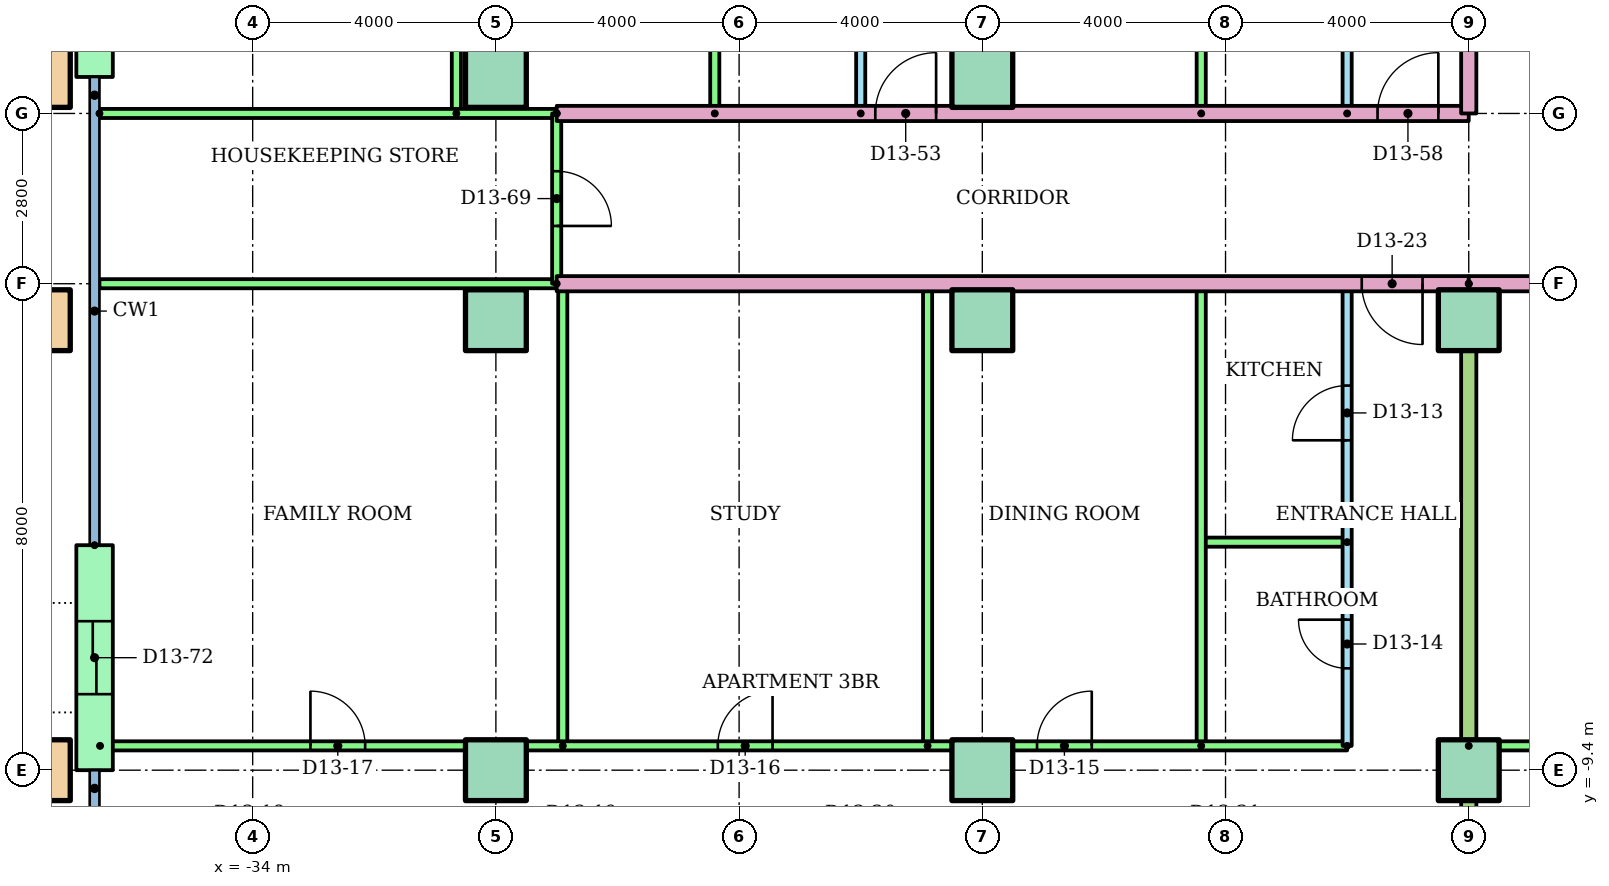
"""IFC4 building model, lengths in metres.
Left out: names, types, materials, properties, quantities, classifications, styles, units other than length and angle.
Written with IfcOpenShell. Run it as: python <this file> out.ifc"""

import sys

from ifc_helpers import new_model, si_unit, direction, frame, frame_2d, origin, origin_2d, place, context, subcontext, project, spatial, rectangle, hollow_rectangle, extrude, element, fill, save


model = new_model("IFC4")
c1 = context("Model", 3, precision=1e-05, world=origin(), true_north=direction((0.0, 1.0)))
c2 = subcontext(c1, "Body", "Model", "MODEL_VIEW")
j1 = project(units=[si_unit("LENGTHUNIT", "METRE"), si_unit("PLANEANGLEUNIT", "RADIAN")], contexts=[c1])
p1 = place(None, origin())
s1 = spatial("IfcSite", under=j1, at=p1, CompositionType="ELEMENT")
p2 = place(p1, origin())
s2 = spatial("IfcBuilding", under=s1, at=p2, CompositionType="ELEMENT")
p3 = place(p2, frame((0.0, 0.0, 51.2)))
s3 = spatial("IfcBuildingStorey", under=s2, at=p3, CompositionType="ELEMENT", Elevation=51.2)
p4 = place(p3, frame((-37.5, -9.4, 0.0)))
e1 = element("IfcColumn", 1, at=p4, inside=s3, PredefinedType="COLUMN", context=c2, shape_type="SweptSolid", body=[
    extrude(hollow_rectangle(XDim=1.0, YDim=1.0, WallThickness=0.05, at=origin_2d()), origin(), (0.0, 0.0, 1.0), 3.2),
])
for number, where in (
    (2, (-30.0, -9.4, 0.0)),
    (3, (-22.0, -9.4, 0.0)),
    (4, (-14.0, -9.4, 0.0)),
):
    element("IfcColumn", number, at=place(p3, frame(where)), inside=s3, PredefinedType="COLUMN", context=c2, shape_type="SweptSolid", body=[
        extrude(rectangle(XDim=1.0, YDim=1.0, at=origin_2d()), origin(), (0.0, 0.0, 1.0), 3.2),
    ])
p5 = place(p3, frame((-37.5, -2.0, 0.0)))
e5 = element("IfcColumn", 5, at=p5, inside=s3, PredefinedType="COLUMN", context=c2, shape_type="SweptSolid", body=[
    extrude(hollow_rectangle(XDim=1.0, YDim=1.0, WallThickness=0.05, at=origin_2d()), origin(), (0.0, 0.0, 1.0), 3.2),
])
for number, where in (
    (6, (-30.0, -2.0, 0.0)),
    (7, (-22.0, -2.0, 0.0)),
    (8, (-14.0, -2.0, 0.0)),
):
    element("IfcColumn", number, at=place(p3, frame(where)), inside=s3, PredefinedType="COLUMN", context=c2, shape_type="SweptSolid", body=[
        extrude(rectangle(XDim=1.0, YDim=1.0, at=origin_2d()), origin(), (0.0, 0.0, 1.0), 3.2),
    ])
p6 = place(p3, frame((-37.5, 2.0, 0.0)))
e9 = element("IfcColumn", 9, at=p6, inside=s3, PredefinedType="COLUMN", context=c2, shape_type="SweptSolid", body=[
    extrude(hollow_rectangle(XDim=1.0, YDim=1.0, WallThickness=0.05, at=origin_2d()), origin(), (0.0, 0.0, 1.0), 3.2),
])
for number, where in (
    (10, (-30.0, 2.0, 0.0)),
    (11, (-22.0, 2.0, 0.0)),
):
    element("IfcColumn", number, at=place(p3, frame(where)), inside=s3, PredefinedType="COLUMN", context=c2, shape_type="SweptSolid", body=[
        extrude(rectangle(XDim=1.0, YDim=1.0, at=origin_2d()), origin(), (0.0, 0.0, 1.0), 3.2),
    ])
p7 = place(p3, frame((-36.6, 6.5, 0.0), z_axis=(0.0, 0.0, 1.0), x_axis=(0.0, -1.0, 0.0)))
e12 = element("IfcWall", 12, at=p7, inside=s3, PredefinedType="STANDARD", context=c2, shape_type="SweptSolid", body=[
    extrude(rectangle(XDim=4.5, YDim=0.6, at=frame_2d((2.25, 0.0))), origin(), (0.0, 0.0, 1.0), 2.92),
])
p8 = place(p7, frame((1.65, 0.0, 0.0)))
e13 = element("IfcOpeningElement", 13, at=p8, cuts=e12, PredefinedType="OPENING", context=c2, shape_type="SweptSolid", body=[
    extrude(rectangle(XDim=1.2, YDim=2.1, at=frame_2d((0.6, 1.05))), frame((0.0, 0.31, 0.0), z_axis=(0.0, -1.0, 0.0), x_axis=(1.0, 0.0, 0.0)), (0.0, 0.0, 1.0), 0.62),
])
p9 = place(p3, frame((-36.6, -5.7, 0.0), z_axis=(0.0, 0.0, 1.0), x_axis=(0.0, -1.0, 0.0)))
e14 = element("IfcWall", 14, at=p9, inside=s3, PredefinedType="STANDARD", context=c2, shape_type="SweptSolid", body=[
    extrude(rectangle(XDim=3.7, YDim=0.6, at=frame_2d((1.85, 0.0))), origin(), (0.0, 0.0, 1.0), 2.92),
])
p10 = place(p9, frame((1.25, 0.0, 0.0)))
e15 = element("IfcOpeningElement", 15, at=p10, cuts=e14, PredefinedType="OPENING", context=c2, shape_type="SweptSolid", body=[
    extrude(rectangle(XDim=1.2, YDim=2.1, at=frame_2d((0.6, 1.05))), frame((0.0, 0.31, 0.0), z_axis=(0.0, -1.0, 0.0), x_axis=(1.0, 0.0, 0.0)), (0.0, 0.0, 1.0), 0.62),
])
p11 = place(p3, frame((-16.0, -9.0, 0.0), z_axis=(0.0, 0.0, 1.0), x_axis=(0.0, 1.0, 0.0)))
e16 = element("IfcWall", 16, at=p11, inside=s3, PredefinedType="PARTITIONING", context=c2, shape_type="SweptSolid", body=[
    extrude(rectangle(XDim=7.6, YDim=0.15, at=frame_2d((3.8, 0.0))), origin(), (0.0, 0.0, 1.0), 2.4),
])
p12 = place(p11, frame((5.025, 0.0, 0.0)))
e17 = element("IfcOpeningElement", 17, at=p12, cuts=e16, PredefinedType="OPENING", context=c2, shape_type="SweptSolid", body=[
    extrude(rectangle(XDim=0.9, YDim=2.1, at=frame_2d((0.45, 1.05))), frame((0.0, 0.085, 0.0), z_axis=(0.0, -1.0, 0.0), x_axis=(1.0, 0.0, 0.0)), (0.0, 0.0, 1.0), 0.17),
])
p13 = place(p11, frame((1.275, 0.0, 0.0)))
e18 = element("IfcOpeningElement", 18, at=p13, cuts=e16, PredefinedType="OPENING", context=c2, shape_type="SweptSolid", body=[
    extrude(rectangle(XDim=0.8, YDim=2.1, at=frame_2d((0.4, 1.05))), frame((0.0, 0.085, 0.0), z_axis=(0.0, -1.0, 0.0), x_axis=(1.0, 0.0, 0.0)), (0.0, 0.0, 1.0), 0.17),
])
p14 = place(p3, frame((-16.0, -5.65, 0.0), z_axis=(0.0, 0.0, 1.0), x_axis=(-1.0, 0.0, 0.0)))
e19 = element("IfcWall", 19, at=p14, inside=s3, PredefinedType="PARTITIONING", context=c2, shape_type="SweptSolid", body=[
    extrude(rectangle(XDim=2.4, YDim=0.15, at=frame_2d((1.2, 0.0))), origin(), (0.0, 0.0, 1.0), 2.4),
])
for number, where, z_axis, x_axis in (
    (20, (-18.4, -9.0, 0.0), (0.0, 0.0, 1.0), (0.0, 1.0, 0.0)),
    (21, (-22.9, -9.0, 0.0), (0.0, 0.0, 1.0), (0.0, 1.0, 0.0)),
    (22, (-28.9, -9.0, 0.0), (0.0, 0.0, 1.0), (0.0, 1.0, 0.0)),
):
    element("IfcWall", number, at=place(p3, frame(where, z_axis=z_axis, x_axis=x_axis)), inside=s3, PredefinedType="PARTITIONING", context=c2, shape_type="SweptSolid", body=[
        extrude(rectangle(XDim=7.6, YDim=0.15, at=frame_2d((3.8, 0.0))), origin(), (0.0, 0.0, 1.0), 2.4),
    ])
p15 = place(p3, frame((-36.51, -9.0, 0.0)))
e23 = element("IfcWall", 23, at=p15, inside=s3, PredefinedType="PARTITIONING", context=c2, shape_type="SweptSolid", body=[
    extrude(rectangle(XDim=20.51, YDim=0.15, at=frame_2d((10.255, 0.0))), origin(), (0.0, 0.0, 1.0), 2.4),
])
p16 = place(p15, frame((15.41, 0.0, 0.0)))
e24 = element("IfcOpeningElement", 24, at=p16, cuts=e23, PredefinedType="OPENING", context=c2, shape_type="SweptSolid", body=[
    extrude(rectangle(XDim=0.9, YDim=2.1, at=frame_2d((0.45, 1.05))), frame((0.0, 0.085, 0.0), z_axis=(0.0, -1.0, 0.0), x_axis=(1.0, 0.0, 0.0)), (0.0, 0.0, 1.0), 0.17),
])
p17 = place(p15, frame((10.16, 0.0, 0.0)))
e25 = element("IfcOpeningElement", 25, at=p17, cuts=e23, PredefinedType="OPENING", context=c2, shape_type="SweptSolid", body=[
    extrude(rectangle(XDim=0.9, YDim=2.1, at=frame_2d((0.45, 1.05))), frame((0.0, 0.085, 0.0), z_axis=(0.0, -1.0, 0.0), x_axis=(1.0, 0.0, 0.0)), (0.0, 0.0, 1.0), 0.17),
])
p18 = place(p15, frame((3.46, 0.0, 0.0)))
e26 = element("IfcOpeningElement", 26, at=p18, cuts=e23, PredefinedType="OPENING", context=c2, shape_type="SweptSolid", body=[
    extrude(rectangle(XDim=0.9, YDim=2.1, at=frame_2d((0.45, 1.05))), frame((0.0, 0.085, 0.0), z_axis=(0.0, -1.0, 0.0), x_axis=(1.0, 0.0, 0.0)), (0.0, 0.0, 1.0), 0.17),
])
p19 = place(p3, frame((-14.0, -9.0, 0.0)))
e27 = element("IfcWall", 27, at=p19, inside=s3, PredefinedType="PARTITIONING", context=c2, shape_type="SweptSolid", body=[
    extrude(rectangle(XDim=22.0, YDim=0.15, at=frame_2d((11.0, 0.0))), origin(), (0.0, 0.0, 1.0), 2.4),
])
p20 = place(p19, frame((16.76, 0.0, 0.0)))
e28 = element("IfcOpeningElement", 28, at=p20, cuts=e27, PredefinedType="OPENING", context=c2, shape_type="SweptSolid", body=[
    extrude(rectangle(XDim=0.9, YDim=2.1, at=frame_2d((0.45, 1.05))), frame((0.0, 0.085, 0.0), z_axis=(0.0, -1.0, 0.0), x_axis=(1.0, 0.0, 0.0)), (0.0, 0.0, 1.0), 0.17),
])
p21 = place(p19, frame((10.9, 0.0, 0.0)))
e29 = element("IfcOpeningElement", 29, at=p21, cuts=e27, PredefinedType="OPENING", context=c2, shape_type="SweptSolid", body=[
    extrude(rectangle(XDim=0.9, YDim=2.1, at=frame_2d((0.45, 1.05))), frame((0.0, 0.085, 0.0), z_axis=(0.0, -1.0, 0.0), x_axis=(1.0, 0.0, 0.0)), (0.0, 0.0, 1.0), 0.17),
])
p22 = place(p19, frame((3.6, 0.0, 0.0)))
e30 = element("IfcOpeningElement", 30, at=p22, cuts=e27, PredefinedType="OPENING", context=c2, shape_type="SweptSolid", body=[
    extrude(rectangle(XDim=0.9, YDim=2.1, at=frame_2d((0.45, 1.05))), frame((0.0, 0.085, 0.0), z_axis=(0.0, -1.0, 0.0), x_axis=(1.0, 0.0, 0.0)), (0.0, 0.0, 1.0), 0.17),
])
p23 = place(p3, frame((-14.0, -1.4, 0.0), z_axis=(0.0, 0.0, 1.0), x_axis=(0.0, -1.0, 0.0)))
e31 = element("IfcWall", 31, at=p23, inside=s3, PredefinedType="PARTITIONING", context=c2, shape_type="SweptSolid", body=[
    extrude(rectangle(XDim=14.71, YDim=0.25, at=frame_2d((7.355, 0.0))), origin(), (0.0, 0.0, 1.0), 2.4),
])
p24 = place(p3, frame((-14.0, -1.4, 0.0), z_axis=(0.0, 0.0, 1.0), x_axis=(-1.0, 0.0, 0.0)))
e32 = element("IfcWall", 32, at=p24, inside=s3, PredefinedType="PARTITIONING", context=c2, shape_type="SweptSolid", body=[
    extrude(rectangle(XDim=15.0, YDim=0.25, at=frame_2d((7.5, 0.0))), origin(), (0.0, 0.0, 1.0), 2.4),
])
p25 = place(p24, frame((0.76, 0.0, 0.0)))
e33 = element("IfcOpeningElement", 33, at=p25, cuts=e32, PredefinedType="OPENING", context=c2, shape_type="SweptSolid", body=[
    extrude(rectangle(XDim=1.0, YDim=2.1, at=frame_2d((0.5, 1.05))), frame((0.0, 0.135, 0.0), z_axis=(0.0, -1.0, 0.0), x_axis=(1.0, 0.0, 0.0)), (0.0, 0.0, 1.0), 0.27),
])
p26 = place(p3, frame((-29.0, -1.4, 0.0), z_axis=(0.0, 0.0, 1.0), x_axis=(-1.0, 0.0, 0.0)))
e34 = element("IfcWall", 34, at=p26, inside=s3, PredefinedType="PARTITIONING", context=c2, shape_type="SweptSolid", body=[
    extrude(rectangle(XDim=7.52, YDim=0.15, at=frame_2d((3.76, 0.0))), origin(), (0.0, 0.0, 1.0), 2.4),
])
p27 = place(p3, frame((-24.0, 1.4, 0.0), z_axis=(0.0, 0.0, 1.0), x_axis=(0.0, 1.0, 0.0)))
e35 = element("IfcWall", 35, at=p27, inside=s3, PredefinedType="PARTITIONING", context=c2, shape_type="SweptSolid", body=[
    extrude(rectangle(XDim=10.0, YDim=0.15, at=frame_2d((5.0, 0.0))), origin(), (0.0, 0.0, 1.0), 2.4),
])
p28 = place(p27, frame((2.3, 0.0, 0.0)))
e36 = element("IfcOpeningElement", 36, at=p28, cuts=e35, PredefinedType="OPENING", context=c2, shape_type="SweptSolid", body=[
    extrude(rectangle(XDim=0.9, YDim=2.1, at=frame_2d((0.45, 1.05))), frame((0.0, 0.085, 0.0), z_axis=(0.0, -1.0, 0.0), x_axis=(1.0, 0.0, 0.0)), (0.0, 0.0, 1.0), 0.17),
])
p29 = place(p27, frame((7.35, 0.0, 0.0)))
e37 = element("IfcOpeningElement", 37, at=p29, cuts=e35, PredefinedType="OPENING", context=c2, shape_type="SweptSolid", body=[
    extrude(rectangle(XDim=0.8, YDim=2.1, at=frame_2d((0.4, 1.05))), frame((0.0, 0.085, 0.0), z_axis=(0.0, -1.0, 0.0), x_axis=(1.0, 0.0, 0.0)), (0.0, 0.0, 1.0), 0.17),
])
for number, where, z_axis, x_axis in (
    (38, (-26.4, 1.4, 0.0), (0.0, 0.0, 1.0), (0.0, 1.0, 0.0)),
    (39, (-30.65, 1.4, 0.0), (0.0, 0.0, 1.0), (0.0, 1.0, 0.0)),
):
    element("IfcWall", number, at=place(p3, frame(where, z_axis=z_axis, x_axis=x_axis)), inside=s3, PredefinedType="PARTITIONING", context=c2, shape_type="SweptSolid", body=[
        extrude(rectangle(XDim=10.0, YDim=0.15, at=frame_2d((5.0, 0.0))), origin(), (0.0, 0.0, 1.0), 2.4),
    ])
p30 = place(p3, frame((-16.0, 1.4, 0.0), z_axis=(0.0, 0.0, 1.0), x_axis=(0.0, 1.0, 0.0)))
e40 = element("IfcWall", 40, at=p30, inside=s3, PredefinedType="PARTITIONING", context=c2, shape_type="SweptSolid", body=[
    extrude(rectangle(XDim=10.0, YDim=0.15, at=frame_2d((5.0, 0.0))), origin(), (0.0, 0.0, 1.0), 2.4),
])
p31 = place(p30, frame((2.3, 0.0, 0.0)))
e41 = element("IfcOpeningElement", 41, at=p31, cuts=e40, PredefinedType="OPENING", context=c2, shape_type="SweptSolid", body=[
    extrude(rectangle(XDim=0.9, YDim=2.1, at=frame_2d((0.45, 1.05))), frame((0.0, 0.085, 0.0), z_axis=(0.0, -1.0, 0.0), x_axis=(1.0, 0.0, 0.0)), (0.0, 0.0, 1.0), 0.17),
])
p32 = place(p30, frame((7.35, 0.0, 0.0)))
e42 = element("IfcOpeningElement", 42, at=p32, cuts=e40, PredefinedType="OPENING", context=c2, shape_type="SweptSolid", body=[
    extrude(rectangle(XDim=0.8, YDim=2.1, at=frame_2d((0.4, 1.05))), frame((0.0, 0.085, 0.0), z_axis=(0.0, -1.0, 0.0), x_axis=(1.0, 0.0, 0.0)), (0.0, 0.0, 1.0), 0.17),
])
p33 = place(p3, frame((-18.4, 1.4, 0.0), z_axis=(0.0, 0.0, 1.0), x_axis=(0.0, 1.0, 0.0)))
e43 = element("IfcWall", 43, at=p33, inside=s3, PredefinedType="PARTITIONING", context=c2, shape_type="SweptSolid", body=[
    extrude(rectangle(XDim=10.0, YDim=0.15, at=frame_2d((5.0, 0.0))), origin(), (0.0, 0.0, 1.0), 2.4),
])
p34 = place(p3, frame((-22.0, 18.521, 0.0), z_axis=(0.0, 0.0, 1.0), x_axis=(0.0, -1.0, 0.0)))
e44 = element("IfcWall", 44, at=p34, inside=s3, PredefinedType="PARTITIONING", context=c2, shape_type="SweptSolid", body=[
    extrude(rectangle(XDim=17.121, YDim=0.25, at=frame_2d((8.561, 0.0))), origin(), (0.0, 0.0, 1.0), 2.4),
])
p35 = place(p3, frame((-29.0, 1.4, 0.0)))
e45 = element("IfcWall", 45, at=p35, inside=s3, PredefinedType="PARTITIONING", context=c2, shape_type="SweptSolid", body=[
    extrude(rectangle(XDim=15.0, YDim=0.25, at=frame_2d((7.5, 0.0))), origin(), (0.0, 0.0, 1.0), 2.4),
])
p36 = place(p35, frame((5.24, 0.0, 0.0)))
e46 = element("IfcOpeningElement", 46, at=p36, cuts=e45, PredefinedType="OPENING", context=c2, shape_type="SweptSolid", body=[
    extrude(rectangle(XDim=1.0, YDim=2.1, at=frame_2d((0.5, 1.05))), frame((0.0, 0.135, 0.0), z_axis=(0.0, -1.0, 0.0), x_axis=(1.0, 0.0, 0.0)), (0.0, 0.0, 1.0), 0.27),
])
p37 = place(p35, frame((13.5, 0.0, 0.0)))
e47 = element("IfcOpeningElement", 47, at=p37, cuts=e45, PredefinedType="OPENING", context=c2, shape_type="SweptSolid", body=[
    extrude(rectangle(XDim=1.0, YDim=2.1, at=frame_2d((0.5, 1.05))), frame((0.0, 0.135, 0.0), z_axis=(0.0, -1.0, 0.0), x_axis=(1.0, 0.0, 0.0)), (0.0, 0.0, 1.0), 0.27),
])
p38 = place(p3, frame((-36.52, 1.4, 0.0)))
e48 = element("IfcWall", 48, at=p38, inside=s3, PredefinedType="PARTITIONING", context=c2, shape_type="SweptSolid", body=[
    extrude(rectangle(XDim=7.52, YDim=0.15, at=frame_2d((3.76, 0.0))), origin(), (0.0, 0.0, 1.0), 2.4),
])
p39 = place(p3, frame((-29.0, 1.4, 0.0), z_axis=(0.0, 0.0, 1.0), x_axis=(0.0, -1.0, 0.0)))
e49 = element("IfcWall", 49, at=p39, inside=s3, PredefinedType="PARTITIONING", context=c2, shape_type="SweptSolid", body=[
    extrude(rectangle(XDim=2.8, YDim=0.15, at=frame_2d((1.4, 0.0))), origin(), (0.0, 0.0, 1.0), 2.4),
])
p40 = place(p39, frame((0.95, 0.0, 0.0)))
e50 = element("IfcOpeningElement", 50, at=p40, cuts=e49, PredefinedType="OPENING", context=c2, shape_type="SweptSolid", body=[
    extrude(rectangle(XDim=0.9, YDim=2.1, at=frame_2d((0.45, 1.05))), frame((0.0, 0.085, 0.0), z_axis=(0.0, -1.0, 0.0), x_axis=(1.0, 0.0, 0.0)), (0.0, 0.0, 1.0), 0.17),
])
p41 = place(p3, frame((14.0, -1.4, 0.0), z_axis=(0.0, 0.0, 1.0), x_axis=(-1.0, 0.0, 0.0)))
e51 = element("IfcWall", 51, at=p41, inside=s3, PredefinedType="PARTITIONING", context=c2, shape_type="SweptSolid", body=[
    extrude(rectangle(XDim=28.0, YDim=0.25, at=frame_2d((14.0, 0.0))), origin(), (0.0, 0.0, 1.0), 2.4),
])
p42 = place(p41, frame((4.76, 0.0, 0.0)))
e52 = element("IfcOpeningElement", 52, at=p42, cuts=e51, PredefinedType="OPENING", context=c2, shape_type="SweptSolid", body=[
    extrude(rectangle(XDim=1.0, YDim=2.1, at=frame_2d((0.5, 1.05))), frame((0.0, 0.135, 0.0), z_axis=(0.0, -1.0, 0.0), x_axis=(1.0, 0.0, 0.0)), (0.0, 0.0, 1.0), 0.27),
])
p43 = place(p41, frame((2.24, 0.0, 0.0)))
e53 = element("IfcOpeningElement", 53, at=p43, cuts=e51, PredefinedType="OPENING", context=c2, shape_type="SweptSolid", body=[
    extrude(rectangle(XDim=1.0, YDim=2.1, at=frame_2d((0.5, 1.05))), frame((0.0, 0.135, 0.0), z_axis=(0.0, -1.0, 0.0), x_axis=(1.0, 0.0, 0.0)), (0.0, 0.0, 1.0), 0.27),
])
p44 = place(p3, frame((-14.0, 3.0, 0.0), z_axis=(0.0, 0.0, 1.0), x_axis=(0.0, -1.0, 0.0)))
e54 = element("IfcWall", 54, at=p44, inside=s3, PredefinedType="PARTITIONING", context=c2, shape_type="SweptSolid", body=[
    extrude(rectangle(XDim=1.6, YDim=0.25, at=frame_2d((0.8, 0.0))), origin(), (0.0, 0.0, 1.0), 2.4),
])
p45 = place(p12, origin())
e55 = element("IfcDoor", 55, at=p45, inside=s3, OperationType="SINGLE_SWING_LEFT", PredefinedType="DOOR", context=c2, shape_type="SweptSolid", body=[
    extrude(rectangle(XDim=0.9, YDim=2.1, at=frame_2d((0.45, 1.05))), frame((0.0, 0.025, 0.0), z_axis=(0.0, -1.0, 0.0), x_axis=(1.0, 0.0, 0.0)), (0.0, 0.0, 1.0), 0.05),
])
fill(e17, e55)
p46 = place(p13, origin())
e56 = element("IfcDoor", 56, at=p46, inside=s3, OperationType="SINGLE_SWING_RIGHT", PredefinedType="DOOR", context=c2, shape_type="SweptSolid", body=[
    extrude(rectangle(XDim=0.8, YDim=2.1, at=frame_2d((0.4, 1.05))), frame((0.0, 0.025, 0.0), z_axis=(0.0, -1.0, 0.0), x_axis=(1.0, 0.0, 0.0)), (0.0, 0.0, 1.0), 0.05),
])
fill(e18, e56)
p47 = place(p16, origin())
e57 = element("IfcDoor", 57, at=p47, inside=s3, OperationType="SINGLE_SWING_RIGHT", PredefinedType="DOOR", context=c2, shape_type="SweptSolid", body=[
    extrude(rectangle(XDim=0.9, YDim=2.1, at=frame_2d((0.45, 1.05))), frame((0.0, 0.025, 0.0), z_axis=(0.0, -1.0, 0.0), x_axis=(1.0, 0.0, 0.0)), (0.0, 0.0, 1.0), 0.05),
])
fill(e24, e57)
p48 = place(p17, origin())
e58 = element("IfcDoor", 58, at=p48, inside=s3, OperationType="SINGLE_SWING_RIGHT", PredefinedType="DOOR", context=c2, shape_type="SweptSolid", body=[
    extrude(rectangle(XDim=0.9, YDim=2.1, at=frame_2d((0.45, 1.05))), frame((0.0, 0.025, 0.0), z_axis=(0.0, -1.0, 0.0), x_axis=(1.0, 0.0, 0.0)), (0.0, 0.0, 1.0), 0.05),
])
fill(e25, e58)
p49 = place(p18, origin())
e59 = element("IfcDoor", 59, at=p49, inside=s3, OperationType="SINGLE_SWING_LEFT", PredefinedType="DOOR", context=c2, shape_type="SweptSolid", body=[
    extrude(rectangle(XDim=0.9, YDim=2.1, at=frame_2d((0.45, 1.05))), frame((0.0, 0.025, 0.0), z_axis=(0.0, -1.0, 0.0), x_axis=(1.0, 0.0, 0.0)), (0.0, 0.0, 1.0), 0.05),
])
fill(e26, e59)
p50 = place(p25, origin())
e60 = element("IfcDoor", 60, at=p50, inside=s3, OperationType="SINGLE_SWING_LEFT", PredefinedType="DOOR", context=c2, shape_type="SweptSolid", body=[
    extrude(rectangle(XDim=1.0, YDim=2.1, at=frame_2d((0.5, 1.05))), frame((0.0, 0.025, 0.0), z_axis=(0.0, -1.0, 0.0), x_axis=(1.0, 0.0, 0.0)), (0.0, 0.0, 1.0), 0.05),
])
fill(e33, e60)
p51 = place(p36, origin())
e61 = element("IfcDoor", 61, at=p51, inside=s3, OperationType="SINGLE_SWING_RIGHT", PredefinedType="DOOR", context=c2, shape_type="SweptSolid", body=[
    extrude(rectangle(XDim=1.0, YDim=2.1, at=frame_2d((0.5, 1.05))), frame((0.0, 0.025, 0.0), z_axis=(0.0, -1.0, 0.0), x_axis=(1.0, 0.0, 0.0)), (0.0, 0.0, 1.0), 0.05),
])
fill(e46, e61)
p52 = place(p37, origin())
e62 = element("IfcDoor", 62, at=p52, inside=s3, OperationType="SINGLE_SWING_RIGHT", PredefinedType="DOOR", context=c2, shape_type="SweptSolid", body=[
    extrude(rectangle(XDim=1.0, YDim=2.1, at=frame_2d((0.5, 1.05))), frame((0.0, 0.025, 0.0), z_axis=(0.0, -1.0, 0.0), x_axis=(1.0, 0.0, 0.0)), (0.0, 0.0, 1.0), 0.05),
])
fill(e47, e62)
p53 = place(p40, origin())
e63 = element("IfcDoor", 63, at=p53, inside=s3, OperationType="SINGLE_SWING_RIGHT", PredefinedType="DOOR", context=c2, shape_type="SweptSolid", body=[
    extrude(rectangle(XDim=0.9, YDim=2.1, at=frame_2d((0.45, 1.05))), frame((0.0, 0.025, 0.0), z_axis=(0.0, -1.0, 0.0), x_axis=(1.0, 0.0, 0.0)), (0.0, 0.0, 1.0), 0.05),
])
fill(e50, e63)
p54 = place(p10, origin())
e64 = element("IfcDoor", 64, at=p54, inside=s3, OperationType="SLIDING_TO_LEFT", PredefinedType="DOOR", context=c2, shape_type="SweptSolid", body=[
    extrude(rectangle(XDim=1.2, YDim=2.1, at=frame_2d((0.6, 1.05))), frame((0.0, 0.025, 0.0), z_axis=(0.0, -1.0, 0.0), x_axis=(1.0, 0.0, 0.0)), (0.0, 0.0, 1.0), 0.05),
])
fill(e15, e64)
save(model, sys.argv[1])
